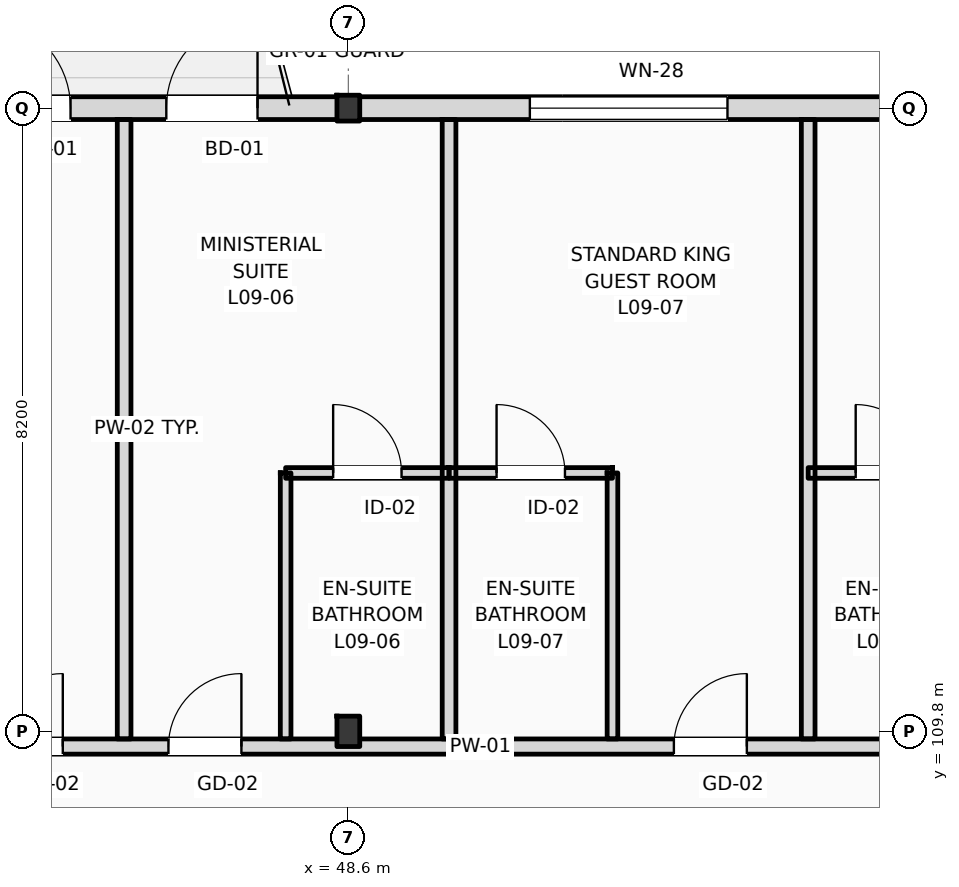
"""IFC4 building model, lengths in metres.
Left out: names, types, materials, properties, quantities, classifications, styles, units other than length and angle.
Written with IfcOpenShell. Run it as: python <this file> out.ifc"""

import sys

from ifc_helpers import new_model, si_unit, direction, frame, frame_2d, origin, origin_2d, place, context, subcontext, project, spatial, rectangle, i_section, extrude, element, fill, save


model = new_model("IFC4")
c1 = context("Model", 3, precision=1e-05, world=origin(), true_north=direction((0.0, 1.0)))
c2 = subcontext(c1, "Body", "Model", "MODEL_VIEW")
j1 = project(units=[si_unit("LENGTHUNIT", "METRE"), si_unit("PLANEANGLEUNIT", "RADIAN")], contexts=[c1])
p1 = place(None, origin())
s1 = spatial("IfcSite", under=j1, at=p1, CompositionType="ELEMENT")
p2 = place(p1, origin())
s2 = spatial("IfcBuilding", under=s1, at=p2, CompositionType="ELEMENT")
p3 = place(p2, frame((0.0, 0.0, 39.0)))
s3 = spatial("IfcBuildingStorey", under=s2, at=p3, CompositionType="ELEMENT", Elevation=39.0)
p4 = place(p3, frame((48.6, 109.8, 0.0), z_axis=(0.0, 0.0, 1.0), x_axis=(1.0, 0.0, 0.0)))
e1 = element("IfcColumn", 1, at=p4, inside=s3, PredefinedType="COLUMN", context=c2, shape_type="SweptSolid", body=[
    extrude(i_section(OverallWidth=0.3, OverallDepth=0.4, WebThickness=0.013, FlangeThickness=0.024, FilletRadius=0.027, at=origin_2d()), origin(), (0.0, 0.0, 1.0), 3.6),
])
p5 = place(p3, frame((48.6, 118.0, 0.0), z_axis=(0.0, 0.0, 1.0), x_axis=(1.0, 0.0, 0.0)))
e2 = element("IfcColumn", 2, at=p5, inside=s3, PredefinedType="COLUMN", context=c2, shape_type="SweptSolid", body=[
    extrude(i_section(OverallWidth=0.3, OverallDepth=0.34, WebThickness=0.012, FlangeThickness=0.021, FilletRadius=0.027, at=origin_2d()), origin(), (0.0, 0.0, 1.0), 3.6),
])
p6 = place(p3, frame((22.5, 118.0, 0.0), z_axis=(0.0, 0.0, 1.0), x_axis=(1.0, 0.0, 0.0)))
e3 = element("IfcWall", 3, at=p6, inside=s3, PredefinedType="STANDARD", context=c2, shape_type="SweptSolid", body=[
    extrude(rectangle(XDim=72.9, YDim=0.3, at=frame_2d((36.45, 0.0))), origin(), (0.0, 0.0, 1.0), 2.92),
])
p7 = place(p6, frame((3.6, 0.0, 0.9)))
e4 = element("IfcOpeningElement", 4, at=p7, cuts=e3, PredefinedType="OPENING", context=c2, shape_type="SweptSolid", body=[
    extrude(rectangle(XDim=1.1, YDim=1.6, at=frame_2d((0.55, 0.8))), frame((0.0, 0.16, 0.0), z_axis=(0.0, -1.0, 0.0), x_axis=(1.0, 0.0, 0.0)), (0.0, 0.0, 1.0), 0.32),
])
p8 = place(p6, frame((6.688, 0.0, 0.0)))
e5 = element("IfcOpeningElement", 5, at=p8, cuts=e3, PredefinedType="OPENING", context=c2, shape_type="SweptSolid", body=[
    extrude(rectangle(XDim=1.2, YDim=2.25, at=frame_2d((0.6, 1.125))), frame((0.0, 0.16, 0.0), z_axis=(0.0, -1.0, 0.0), x_axis=(1.0, 0.0, 0.0)), (0.0, 0.0, 1.0), 0.32),
])
p9 = place(p6, frame((11.388, 0.0, 0.9)))
e6 = element("IfcOpeningElement", 6, at=p9, cuts=e3, PredefinedType="OPENING", context=c2, shape_type="SweptSolid", body=[
    extrude(rectangle(XDim=1.6, YDim=1.75, at=frame_2d((0.8, 0.875))), frame((0.0, 0.16, 0.0), z_axis=(0.0, -1.0, 0.0), x_axis=(1.0, 0.0, 0.0)), (0.0, 0.0, 1.0), 0.32),
])
p10 = place(p6, frame((15.413, 0.0, 0.9)))
e7 = element("IfcOpeningElement", 7, at=p10, cuts=e3, PredefinedType="OPENING", context=c2, shape_type="SweptSolid", body=[
    extrude(rectangle(XDim=1.75, YDim=1.84, at=frame_2d((0.875, 0.92))), frame((0.0, 0.16, 0.0), z_axis=(0.0, -1.0, 0.0), x_axis=(1.0, 0.0, 0.0)), (0.0, 0.0, 1.0), 0.32),
])
p11 = place(p6, frame((21.245, 0.0, 0.0)))
e8 = element("IfcOpeningElement", 8, at=p11, cuts=e3, PredefinedType="OPENING", context=c2, shape_type="SweptSolid", body=[
    extrude(rectangle(XDim=1.2, YDim=2.25, at=frame_2d((0.6, 1.125))), frame((0.0, 0.16, 0.0), z_axis=(0.0, -1.0, 0.0), x_axis=(1.0, 0.0, 0.0)), (0.0, 0.0, 1.0), 0.32),
])
p12 = place(p6, frame((23.705, 0.0, 0.0)))
e9 = element("IfcOpeningElement", 9, at=p12, cuts=e3, PredefinedType="OPENING", context=c2, shape_type="SweptSolid", body=[
    extrude(rectangle(XDim=1.2, YDim=2.25, at=frame_2d((0.6, 1.125))), frame((0.0, 0.16, 0.0), z_axis=(0.0, -1.0, 0.0), x_axis=(1.0, 0.0, 0.0)), (0.0, 0.0, 1.0), 0.32),
])
p13 = place(p6, frame((28.488, 0.0, 0.9)))
e10 = element("IfcOpeningElement", 10, at=p13, cuts=e3, PredefinedType="OPENING", context=c2, shape_type="SweptSolid", body=[
    extrude(rectangle(XDim=2.6, YDim=1.84, at=frame_2d((1.3, 0.92))), frame((0.0, 0.16, 0.0), z_axis=(0.0, -1.0, 0.0), x_axis=(1.0, 0.0, 0.0)), (0.0, 0.0, 1.0), 0.32),
])
p14 = place(p6, frame((34.76, 0.0, 0.9)))
e11 = element("IfcOpeningElement", 11, at=p14, cuts=e3, PredefinedType="OPENING", context=c2, shape_type="SweptSolid", body=[
    extrude(rectangle(XDim=1.1, YDim=1.84, at=frame_2d((0.55, 0.92))), frame((0.0, 0.16, 0.0), z_axis=(0.0, -1.0, 0.0), x_axis=(1.0, 0.0, 0.0)), (0.0, 0.0, 1.0), 0.32),
])
p15 = place(p6, frame((38.143, 0.0, 0.0)))
e12 = element("IfcOpeningElement", 12, at=p15, cuts=e3, PredefinedType="OPENING", context=c2, shape_type="SweptSolid", body=[
    extrude(rectangle(XDim=1.2, YDim=2.25, at=frame_2d((0.6, 1.125))), frame((0.0, 0.16, 0.0), z_axis=(0.0, -1.0, 0.0), x_axis=(1.0, 0.0, 0.0)), (0.0, 0.0, 1.0), 0.32),
])
p16 = place(p6, frame((42.687, 0.0, 0.9)))
e13 = element("IfcOpeningElement", 13, at=p16, cuts=e3, PredefinedType="OPENING", context=c2, shape_type="SweptSolid", body=[
    extrude(rectangle(XDim=1.2, YDim=1.8, at=frame_2d((0.6, 0.9))), frame((0.0, 0.16, 0.0), z_axis=(0.0, -1.0, 0.0), x_axis=(1.0, 0.0, 0.0)), (0.0, 0.0, 1.0), 0.32),
])
p17 = place(p6, frame((47.112, 0.0, 0.9)))
e14 = element("IfcOpeningElement", 14, at=p17, cuts=e3, PredefinedType="OPENING", context=c2, shape_type="SweptSolid", body=[
    extrude(rectangle(XDim=1.35, YDim=1.84, at=frame_2d((0.675, 0.92))), frame((0.0, 0.16, 0.0), z_axis=(0.0, -1.0, 0.0), x_axis=(1.0, 0.0, 0.0)), (0.0, 0.0, 1.0), 0.32),
])
p18 = place(p6, frame((52.482, 0.0, 0.0)))
e15 = element("IfcOpeningElement", 15, at=p18, cuts=e3, PredefinedType="OPENING", context=c2, shape_type="SweptSolid", body=[
    extrude(rectangle(XDim=1.2, YDim=2.25, at=frame_2d((0.6, 1.125))), frame((0.0, 0.16, 0.0), z_axis=(0.0, -1.0, 0.0), x_axis=(1.0, 0.0, 0.0)), (0.0, 0.0, 1.0), 0.32),
])
p19 = place(p6, frame((54.942, 0.0, 0.0)))
e16 = element("IfcOpeningElement", 16, at=p19, cuts=e3, PredefinedType="OPENING", context=c2, shape_type="SweptSolid", body=[
    extrude(rectangle(XDim=1.2, YDim=2.25, at=frame_2d((0.6, 1.125))), frame((0.0, 0.16, 0.0), z_axis=(0.0, -1.0, 0.0), x_axis=(1.0, 0.0, 0.0)), (0.0, 0.0, 1.0), 0.32),
])
p20 = place(p6, frame((60.387, 0.0, 0.9)))
e17 = element("IfcOpeningElement", 17, at=p20, cuts=e3, PredefinedType="OPENING", context=c2, shape_type="SweptSolid", body=[
    extrude(rectangle(XDim=1.8, YDim=1.84, at=frame_2d((0.9, 0.92))), frame((0.0, 0.16, 0.0), z_axis=(0.0, -1.0, 0.0), x_axis=(1.0, 0.0, 0.0)), (0.0, 0.0, 1.0), 0.32),
])
p21 = place(p6, frame((66.013, 0.0, 0.9)))
e18 = element("IfcOpeningElement", 18, at=p21, cuts=e3, PredefinedType="OPENING", context=c2, shape_type="SweptSolid", body=[
    extrude(rectangle(XDim=1.35, YDim=1.84, at=frame_2d((0.675, 0.92))), frame((0.0, 0.16, 0.0), z_axis=(0.0, -1.0, 0.0), x_axis=(1.0, 0.0, 0.0)), (0.0, 0.0, 1.0), 0.32),
])
p22 = place(p6, frame((69.275, 0.0, 0.9)))
e19 = element("IfcOpeningElement", 19, at=p22, cuts=e3, PredefinedType="OPENING", context=c2, shape_type="SweptSolid", body=[
    extrude(rectangle(XDim=2.1, YDim=1.84, at=frame_2d((1.05, 0.92))), frame((0.0, 0.16, 0.0), z_axis=(0.0, -1.0, 0.0), x_axis=(1.0, 0.0, 0.0)), (0.0, 0.0, 1.0), 0.32),
])
p23 = place(p3, frame((10.65, 109.6, 0.0), z_axis=(0.0, 0.0, 1.0), x_axis=(1.0, 0.0, 0.0)))
e20 = element("IfcWall", 20, at=p23, inside=s3, PredefinedType="PARTITIONING", context=c2, shape_type="SweptSolid", body=[
    extrude(rectangle(XDim=84.61, YDim=0.2, at=frame_2d((42.305, 0.0))), origin(), (0.0, 0.0, 1.0), 2.82),
])
p24 = place(p23, frame((15.49, 0.0, 0.0)))
e21 = element("IfcOpeningElement", 21, at=p24, cuts=e20, PredefinedType="OPENING", context=c2, shape_type="SweptSolid", body=[
    extrude(rectangle(XDim=1.02, YDim=2.2, at=frame_2d((0.51, 1.1))), frame((0.0, 0.11, 0.0), z_axis=(0.0, -1.0, 0.0), x_axis=(1.0, 0.0, 0.0)), (0.0, 0.0, 1.0), 0.22),
])
p25 = place(p23, frame((19.703, 0.0, 0.0)))
e22 = element("IfcOpeningElement", 22, at=p25, cuts=e20, PredefinedType="OPENING", context=c2, shape_type="SweptSolid", body=[
    extrude(rectangle(XDim=1.02, YDim=2.2, at=frame_2d((0.51, 1.1))), frame((0.0, 0.11, 0.0), z_axis=(0.0, -1.0, 0.0), x_axis=(1.0, 0.0, 0.0)), (0.0, 0.0, 1.0), 0.22),
])
p26 = place(p23, frame((24.203, 0.0, 0.0)))
e23 = element("IfcOpeningElement", 23, at=p26, cuts=e20, PredefinedType="OPENING", context=c2, shape_type="SweptSolid", body=[
    extrude(rectangle(XDim=1.02, YDim=2.2, at=frame_2d((0.51, 1.1))), frame((0.0, 0.11, 0.0), z_axis=(0.0, -1.0, 0.0), x_axis=(1.0, 0.0, 0.0)), (0.0, 0.0, 1.0), 0.22),
])
p27 = place(p23, frame((26.552, 0.0, 0.0)))
e24 = element("IfcOpeningElement", 24, at=p27, cuts=e20, PredefinedType="OPENING", context=c2, shape_type="SweptSolid", body=[
    extrude(rectangle(XDim=1.02, YDim=2.2, at=frame_2d((0.51, 1.1))), frame((0.0, 0.11, 0.0), z_axis=(0.0, -1.0, 0.0), x_axis=(1.0, 0.0, 0.0)), (0.0, 0.0, 1.0), 0.22),
])
p28 = place(p23, frame((33.233, 0.0, 0.0)))
e25 = element("IfcOpeningElement", 25, at=p28, cuts=e20, PredefinedType="OPENING", context=c2, shape_type="SweptSolid", body=[
    extrude(rectangle(XDim=0.96, YDim=2.2, at=frame_2d((0.48, 1.1))), frame((0.0, 0.11, 0.0), z_axis=(0.0, -1.0, 0.0), x_axis=(1.0, 0.0, 0.0)), (0.0, 0.0, 1.0), 0.22),
])
p29 = place(p23, frame((35.583, 0.0, 0.0)))
e26 = element("IfcOpeningElement", 26, at=p29, cuts=e20, PredefinedType="OPENING", context=c2, shape_type="SweptSolid", body=[
    extrude(rectangle(XDim=0.96, YDim=2.2, at=frame_2d((0.48, 1.1))), frame((0.0, 0.11, 0.0), z_axis=(0.0, -1.0, 0.0), x_axis=(1.0, 0.0, 0.0)), (0.0, 0.0, 1.0), 0.22),
])
p30 = place(p23, frame((42.233, 0.0, 0.0)))
e27 = element("IfcOpeningElement", 27, at=p30, cuts=e20, PredefinedType="OPENING", context=c2, shape_type="SweptSolid", body=[
    extrude(rectangle(XDim=0.96, YDim=2.2, at=frame_2d((0.48, 1.1))), frame((0.0, 0.11, 0.0), z_axis=(0.0, -1.0, 0.0), x_axis=(1.0, 0.0, 0.0)), (0.0, 0.0, 1.0), 0.22),
])
p31 = place(p23, frame((46.983, 0.0, 0.0)))
e28 = element("IfcOpeningElement", 28, at=p31, cuts=e20, PredefinedType="OPENING", context=c2, shape_type="SweptSolid", body=[
    extrude(rectangle(XDim=0.96, YDim=2.2, at=frame_2d((0.48, 1.1))), frame((0.0, 0.11, 0.0), z_axis=(0.0, -1.0, 0.0), x_axis=(1.0, 0.0, 0.0)), (0.0, 0.0, 1.0), 0.22),
])
p32 = place(p23, frame((51.233, 0.0, 0.0)))
e29 = element("IfcOpeningElement", 29, at=p32, cuts=e20, PredefinedType="OPENING", context=c2, shape_type="SweptSolid", body=[
    extrude(rectangle(XDim=0.96, YDim=2.2, at=frame_2d((0.48, 1.1))), frame((0.0, 0.11, 0.0), z_axis=(0.0, -1.0, 0.0), x_axis=(1.0, 0.0, 0.0)), (0.0, 0.0, 1.0), 0.22),
])
p33 = place(p23, frame((55.733, 0.0, 0.0)))
e30 = element("IfcOpeningElement", 30, at=p33, cuts=e20, PredefinedType="OPENING", context=c2, shape_type="SweptSolid", body=[
    extrude(rectangle(XDim=0.96, YDim=2.2, at=frame_2d((0.48, 1.1))), frame((0.0, 0.11, 0.0), z_axis=(0.0, -1.0, 0.0), x_axis=(1.0, 0.0, 0.0)), (0.0, 0.0, 1.0), 0.22),
])
p34 = place(p23, frame((58.083, 0.0, 0.0)))
e31 = element("IfcOpeningElement", 31, at=p34, cuts=e20, PredefinedType="OPENING", context=c2, shape_type="SweptSolid", body=[
    extrude(rectangle(XDim=0.96, YDim=2.2, at=frame_2d((0.48, 1.1))), frame((0.0, 0.11, 0.0), z_axis=(0.0, -1.0, 0.0), x_axis=(1.0, 0.0, 0.0)), (0.0, 0.0, 1.0), 0.22),
])
p35 = place(p23, frame((64.732, 0.0, 0.0)))
e32 = element("IfcOpeningElement", 32, at=p35, cuts=e20, PredefinedType="OPENING", context=c2, shape_type="SweptSolid", body=[
    extrude(rectangle(XDim=0.96, YDim=2.2, at=frame_2d((0.48, 1.1))), frame((0.0, 0.11, 0.0), z_axis=(0.0, -1.0, 0.0), x_axis=(1.0, 0.0, 0.0)), (0.0, 0.0, 1.0), 0.22),
])
p36 = place(p23, frame((66.832, 0.0, 0.0)))
e33 = element("IfcOpeningElement", 33, at=p36, cuts=e20, PredefinedType="OPENING", context=c2, shape_type="SweptSolid", body=[
    extrude(rectangle(XDim=0.96, YDim=2.2, at=frame_2d((0.48, 1.1))), frame((0.0, 0.11, 0.0), z_axis=(0.0, -1.0, 0.0), x_axis=(1.0, 0.0, 0.0)), (0.0, 0.0, 1.0), 0.22),
])
p37 = place(p23, frame((73.732, 0.0, 0.0)))
e34 = element("IfcOpeningElement", 34, at=p37, cuts=e20, PredefinedType="OPENING", context=c2, shape_type="SweptSolid", body=[
    extrude(rectangle(XDim=0.96, YDim=2.2, at=frame_2d((0.48, 1.1))), frame((0.0, 0.11, 0.0), z_axis=(0.0, -1.0, 0.0), x_axis=(1.0, 0.0, 0.0)), (0.0, 0.0, 1.0), 0.22),
])
p38 = place(p23, frame((78.233, 0.0, 0.0)))
e35 = element("IfcOpeningElement", 35, at=p38, cuts=e20, PredefinedType="OPENING", context=c2, shape_type="SweptSolid", body=[
    extrude(rectangle(XDim=0.96, YDim=2.2, at=frame_2d((0.48, 1.1))), frame((0.0, 0.11, 0.0), z_axis=(0.0, -1.0, 0.0), x_axis=(1.0, 0.0, 0.0)), (0.0, 0.0, 1.0), 0.22),
])
p39 = place(p23, frame((80.62, 0.0, 0.0)))
e36 = element("IfcOpeningElement", 36, at=p39, cuts=e20, PredefinedType="OPENING", context=c2, shape_type="SweptSolid", body=[
    extrude(rectangle(XDim=0.96, YDim=2.2, at=frame_2d((0.48, 1.1))), frame((0.0, 0.11, 0.0), z_axis=(0.0, -1.0, 0.0), x_axis=(1.0, 0.0, 0.0)), (0.0, 0.0, 1.0), 0.22),
])
p40 = place(p23, frame((2.716, 0.0, 0.0)))
e37 = element("IfcOpeningElement", 37, at=p40, cuts=e20, PredefinedType="OPENING", context=c2, shape_type="SweptSolid", body=[
    extrude(rectangle(XDim=1.35, YDim=2.25, at=frame_2d((0.675, 1.125))), frame((0.0, 0.11, 0.0), z_axis=(0.0, -1.0, 0.0), x_axis=(1.0, 0.0, 0.0)), (0.0, 0.0, 1.0), 0.22),
])
p41 = place(p23, frame((6.65, 0.0, 0.0)))
e38 = element("IfcOpeningElement", 38, at=p41, cuts=e20, PredefinedType="OPENING", context=c2, shape_type="SweptSolid", body=[
    extrude(rectangle(XDim=1.35, YDim=2.25, at=frame_2d((0.675, 1.125))), frame((0.0, 0.11, 0.0), z_axis=(0.0, -1.0, 0.0), x_axis=(1.0, 0.0, 0.0)), (0.0, 0.0, 1.0), 0.22),
])
p42 = place(p23, frame((10.583, 0.0, 0.0)))
e39 = element("IfcOpeningElement", 39, at=p42, cuts=e20, PredefinedType="OPENING", context=c2, shape_type="SweptSolid", body=[
    extrude(rectangle(XDim=1.35, YDim=2.25, at=frame_2d((0.675, 1.125))), frame((0.0, 0.11, 0.0), z_axis=(0.0, -1.0, 0.0), x_axis=(1.0, 0.0, 0.0)), (0.0, 0.0, 1.0), 0.22),
])
for number, where, z_axis, x_axis in (
    (40, (45.65, 109.7, 0.0), (0.0, 0.0, 1.0), (0.0, 1.0, 0.0)),
    (41, (49.925, 109.7, 0.0), (0.0, 0.0, 1.0), (0.0, 1.0, 0.0)),
):
    element("IfcWall", number, at=place(p3, frame(where, z_axis=z_axis, x_axis=x_axis)), inside=s3, PredefinedType="PARTITIONING", context=c2, shape_type="SweptSolid", body=[
        extrude(rectangle(XDim=8.15, YDim=0.18, at=frame_2d((4.075, 0.0))), origin(), (0.0, 0.0, 1.0), 3.38),
    ])
p43 = place(p3, frame((47.775, 109.7, 0.0), z_axis=(0.0, 0.0, 1.0), x_axis=(0.0, 1.0, 0.0)))
e42 = element("IfcWall", 42, at=p43, inside=s3, PredefinedType="PARTITIONING", context=c2, shape_type="SweptSolid", body=[
    extrude(rectangle(XDim=3.5, YDim=0.14, at=frame_2d((1.75, 0.0))), origin(), (0.0, 0.0, 1.0), 3.38),
])
p44 = place(p3, frame((47.775, 113.2, 0.0), z_axis=(0.0, 0.0, 1.0), x_axis=(1.0, 0.0, 0.0)))
e43 = element("IfcWall", 43, at=p44, inside=s3, PredefinedType="PARTITIONING", context=c2, shape_type="SweptSolid", body=[
    extrude(rectangle(XDim=2.15, YDim=0.14, at=frame_2d((1.075, 0.0))), origin(), (0.0, 0.0, 1.0), 3.38),
])
p45 = place(p44, frame((0.625, 0.0, 0.0)))
e44 = element("IfcOpeningElement", 44, at=p45, cuts=e43, PredefinedType="OPENING", context=c2, shape_type="SweptSolid", body=[
    extrude(rectangle(XDim=0.9, YDim=2.1, at=frame_2d((0.45, 1.05))), frame((0.0, 0.08, 0.0), z_axis=(0.0, -1.0, 0.0), x_axis=(1.0, 0.0, 0.0)), (0.0, 0.0, 1.0), 0.16),
])
p46 = place(p3, frame((54.65, 109.7, 0.0), z_axis=(0.0, 0.0, 1.0), x_axis=(0.0, 1.0, 0.0)))
e45 = element("IfcWall", 45, at=p46, inside=s3, PredefinedType="PARTITIONING", context=c2, shape_type="SweptSolid", body=[
    extrude(rectangle(XDim=8.15, YDim=0.18, at=frame_2d((4.075, 0.0))), origin(), (0.0, 0.0, 1.0), 3.38),
])
p47 = place(p3, frame((52.075, 109.7, 0.0), z_axis=(0.0, 0.0, 1.0), x_axis=(0.0, 1.0, 0.0)))
e46 = element("IfcWall", 46, at=p47, inside=s3, PredefinedType="PARTITIONING", context=c2, shape_type="SweptSolid", body=[
    extrude(rectangle(XDim=3.5, YDim=0.14, at=frame_2d((1.75, 0.0))), origin(), (0.0, 0.0, 1.0), 3.38),
])
p48 = place(p3, frame((49.925, 113.2, 0.0), z_axis=(0.0, 0.0, 1.0), x_axis=(1.0, 0.0, 0.0)))
e47 = element("IfcWall", 47, at=p48, inside=s3, PredefinedType="PARTITIONING", context=c2, shape_type="SweptSolid", body=[
    extrude(rectangle(XDim=2.15, YDim=0.14, at=frame_2d((1.075, 0.0))), origin(), (0.0, 0.0, 1.0), 3.38),
])
p49 = place(p48, frame((0.625, 0.0, 0.0)))
e48 = element("IfcOpeningElement", 48, at=p49, cuts=e47, PredefinedType="OPENING", context=c2, shape_type="SweptSolid", body=[
    extrude(rectangle(XDim=0.9, YDim=2.1, at=frame_2d((0.45, 1.05))), frame((0.0, 0.08, 0.0), z_axis=(0.0, -1.0, 0.0), x_axis=(1.0, 0.0, 0.0)), (0.0, 0.0, 1.0), 0.16),
])
p50 = place(p3, frame((54.65, 113.2, 0.0), z_axis=(0.0, 0.0, 1.0), x_axis=(1.0, 0.0, 0.0)))
e49 = element("IfcWall", 49, at=p50, inside=s3, PredefinedType="PARTITIONING", context=c2, shape_type="SweptSolid", body=[
    extrude(rectangle(XDim=2.15, YDim=0.14, at=frame_2d((1.075, 0.0))), origin(), (0.0, 0.0, 1.0), 3.38),
])
p51 = place(p50, frame((0.625, 0.0, 0.0)))
e50 = element("IfcOpeningElement", 50, at=p51, cuts=e49, PredefinedType="OPENING", context=c2, shape_type="SweptSolid", body=[
    extrude(rectangle(XDim=0.9, YDim=2.1, at=frame_2d((0.45, 1.05))), frame((0.0, 0.08, 0.0), z_axis=(0.0, -1.0, 0.0), x_axis=(1.0, 0.0, 0.0)), (0.0, 0.0, 1.0), 0.16),
])
p52 = place(p11, origin())
e51 = element("IfcDoor", 51, at=p52, inside=s3, OperationType="SINGLE_SWING_LEFT", PredefinedType="DOOR", context=c2, shape_type="SweptSolid", body=[
    extrude(rectangle(XDim=1.2, YDim=2.25, at=frame_2d((0.6, 1.125))), frame((0.0, 0.025, 0.0), z_axis=(0.0, -1.0, 0.0), x_axis=(1.0, 0.0, 0.0)), (0.0, 0.0, 1.0), 0.05),
])
fill(e8, e51)
p53 = place(p12, origin())
e52 = element("IfcDoor", 52, at=p53, inside=s3, OperationType="SINGLE_SWING_RIGHT", PredefinedType="DOOR", context=c2, shape_type="SweptSolid", body=[
    extrude(rectangle(XDim=1.2, YDim=2.25, at=frame_2d((0.6, 1.125))), frame((0.0, 0.025, 0.0), z_axis=(0.0, -1.0, 0.0), x_axis=(1.0, 0.0, 0.0)), (0.0, 0.0, 1.0), 0.05),
])
fill(e9, e52)
p54 = place(p13, origin())
e53 = element("IfcWindow", 53, at=p54, inside=s3, PartitioningType="DOUBLE_PANEL_VERTICAL", PredefinedType="WINDOW", context=c2, shape_type="SweptSolid", body=[
    extrude(rectangle(XDim=2.6, YDim=1.84, at=frame_2d((1.3, 0.92))), frame((0.0, 0.03, 0.0), z_axis=(0.0, -1.0, 0.0), x_axis=(1.0, 0.0, 0.0)), (0.0, 0.0, 1.0), 0.06),
])
fill(e10, e53)
p55 = place(p28, origin())
e54 = element("IfcDoor", 54, at=p55, inside=s3, OperationType="SINGLE_SWING_RIGHT", PredefinedType="DOOR", context=c2, shape_type="SweptSolid", body=[
    extrude(rectangle(XDim=0.96, YDim=2.2, at=frame_2d((0.48, 1.1))), frame((0.0, 0.025, 0.0), z_axis=(0.0, -1.0, 0.0), x_axis=(1.0, 0.0, 0.0)), (0.0, 0.0, 1.0), 0.05),
])
fill(e25, e54)
p56 = place(p29, origin())
e55 = element("IfcDoor", 55, at=p56, inside=s3, OperationType="SINGLE_SWING_RIGHT", PredefinedType="DOOR", context=c2, shape_type="SweptSolid", body=[
    extrude(rectangle(XDim=0.96, YDim=2.2, at=frame_2d((0.48, 1.1))), frame((0.0, 0.025, 0.0), z_axis=(0.0, -1.0, 0.0), x_axis=(1.0, 0.0, 0.0)), (0.0, 0.0, 1.0), 0.05),
])
fill(e26, e55)
p57 = place(p45, origin())
e56 = element("IfcDoor", 56, at=p57, inside=s3, OperationType="SINGLE_SWING_LEFT", PredefinedType="DOOR", context=c2, shape_type="SweptSolid", body=[
    extrude(rectangle(XDim=0.9, YDim=2.1, at=frame_2d((0.45, 1.05))), frame((0.0, 0.025, 0.0), z_axis=(0.0, -1.0, 0.0), x_axis=(1.0, 0.0, 0.0)), (0.0, 0.0, 1.0), 0.05),
])
fill(e44, e56)
p58 = place(p30, origin())
e57 = element("IfcDoor", 57, at=p58, inside=s3, OperationType="SINGLE_SWING_RIGHT", PredefinedType="DOOR", context=c2, shape_type="SweptSolid", body=[
    extrude(rectangle(XDim=0.96, YDim=2.2, at=frame_2d((0.48, 1.1))), frame((0.0, 0.025, 0.0), z_axis=(0.0, -1.0, 0.0), x_axis=(1.0, 0.0, 0.0)), (0.0, 0.0, 1.0), 0.05),
])
fill(e27, e57)
p59 = place(p49, origin())
e58 = element("IfcDoor", 58, at=p59, inside=s3, OperationType="SINGLE_SWING_LEFT", PredefinedType="DOOR", context=c2, shape_type="SweptSolid", body=[
    extrude(rectangle(XDim=0.9, YDim=2.1, at=frame_2d((0.45, 1.05))), frame((0.0, 0.025, 0.0), z_axis=(0.0, -1.0, 0.0), x_axis=(1.0, 0.0, 0.0)), (0.0, 0.0, 1.0), 0.05),
])
fill(e48, e58)
p60 = place(p51, origin())
e59 = element("IfcDoor", 59, at=p60, inside=s3, OperationType="SINGLE_SWING_LEFT", PredefinedType="DOOR", context=c2, shape_type="SweptSolid", body=[
    extrude(rectangle(XDim=0.9, YDim=2.1, at=frame_2d((0.45, 1.05))), frame((0.0, 0.025, 0.0), z_axis=(0.0, -1.0, 0.0), x_axis=(1.0, 0.0, 0.0)), (0.0, 0.0, 1.0), 0.05),
])
fill(e50, e59)
save(model, sys.argv[1])
